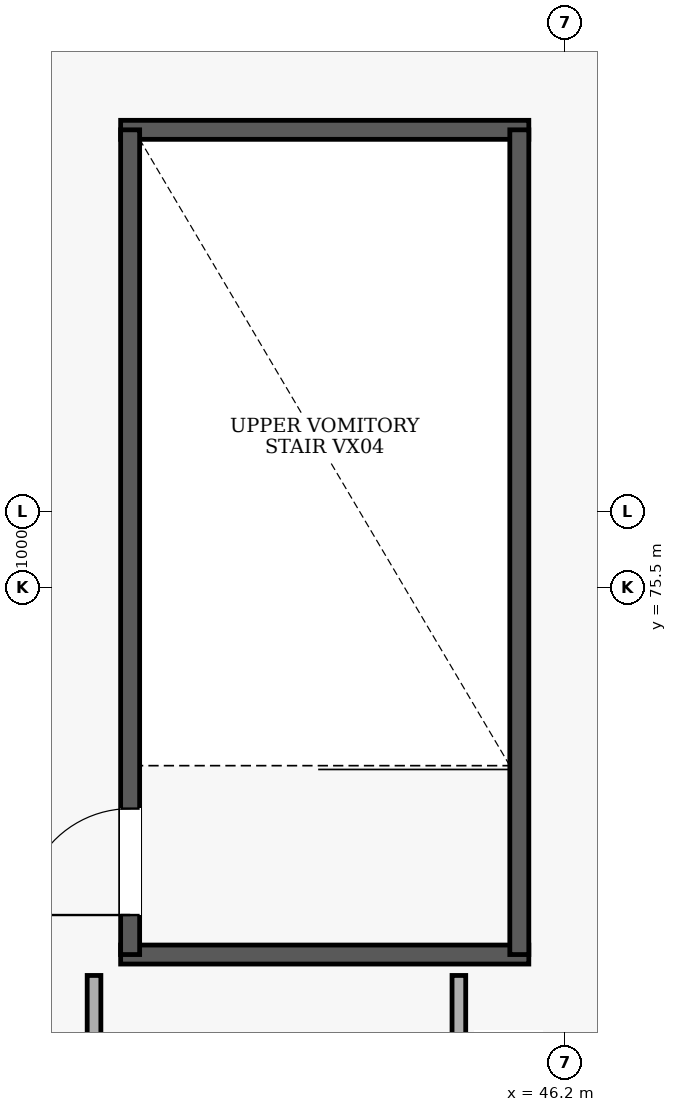
"""IFC4 building model, lengths in metres.
Left out: names, types, materials, properties, quantities, classifications, styles, units other than length and angle.
Written with IfcOpenShell. Run it as: python <this file> out.ifc"""

import sys

from ifc_helpers import new_model, si_unit, direction, frame, frame_2d, origin, place, context, subcontext, project, spatial, rectangle, extrude, element, fill, save


model = new_model("IFC4")
c1 = context("Model", 3, precision=1e-05, world=origin(), true_north=direction((0.0, 1.0)))
c2 = subcontext(c1, "Body", "Model", "MODEL_VIEW")
j1 = project(units=[si_unit("LENGTHUNIT", "METRE"), si_unit("PLANEANGLEUNIT", "RADIAN")], contexts=[c1])
p1 = place(None, origin())
s1 = spatial("IfcSite", under=j1, at=p1, CompositionType="ELEMENT")
p2 = place(p1, origin())
s2 = spatial("IfcBuilding", under=s1, at=p2, CompositionType="ELEMENT")
p3 = place(p2, frame((0.0, 0.0, 15.0)))
s3 = spatial("IfcBuildingStorey", under=s2, at=p3, CompositionType="ELEMENT", Elevation=15.0)
for number, where, z_axis, x_axis in (
    (1, (40.35, 70.675, 0.0), (0.0, 0.0, 1.0), (1.0, 0.0, 0.0)),
    (2, (45.72, 81.525, 0.0), (0.0, 0.0, 1.0), (-1.0, 0.0, 0.0)),
):
    element("IfcWall", number, at=place(p3, frame(where, z_axis=z_axis, x_axis=x_axis)), inside=s3, PredefinedType="SHEAR", context=c2, shape_type="SweptSolid", body=[
        extrude(rectangle(XDim=5.37, YDim=0.25, at=frame_2d((2.685, 0.0))), origin(), (0.0, 0.0, 1.0), 4.5),
    ])
p4 = place(p3, frame((40.475, 70.675, 0.0), z_axis=(0.0, 0.0, 1.0), x_axis=(0.0, 1.0, 0.0)))
e3 = element("IfcWall", 3, at=p4, inside=s3, PredefinedType="SHEAR", context=c2, shape_type="SweptSolid", body=[
    extrude(rectangle(XDim=10.85, YDim=0.25, at=frame_2d((5.425, 0.0))), origin(), (0.0, 0.0, 1.0), 4.5),
])
p5 = place(p4, frame((0.52, 0.0, 0.0)))
e4 = element("IfcOpeningElement", 4, at=p5, cuts=e3, PredefinedType="OPENING", context=c2, shape_type="SweptSolid", body=[
    extrude(rectangle(XDim=1.4, YDim=2.15, at=frame_2d((0.7, 1.075))), frame((0.0, 0.135, 0.0), z_axis=(0.0, -1.0, 0.0), x_axis=(1.0, 0.0, 0.0)), (0.0, 0.0, 1.0), 0.27),
])
p6 = place(p3, frame((45.595, 70.675, 0.0), z_axis=(0.0, 0.0, 1.0), x_axis=(0.0, 1.0, 0.0)))
e5 = element("IfcWall", 5, at=p6, inside=s3, PredefinedType="SHEAR", context=c2, shape_type="SweptSolid", body=[
    extrude(rectangle(XDim=10.85, YDim=0.25, at=frame_2d((5.425, 0.0))), origin(), (0.0, 0.0, 1.0), 4.5),
])
p7 = place(p3, frame((44.8, 67.33, 0.0), z_axis=(0.0, 0.0, 1.0), x_axis=(0.0, 1.0, 0.0)))
e6 = element("IfcWall", 6, at=p7, inside=s3, PredefinedType="PARTITIONING", context=c2, shape_type="SweptSolid", body=[
    extrude(rectangle(XDim=3.07, YDim=0.18, at=frame_2d((1.535, 0.0))), origin(), (0.0, 0.0, 1.0), 4.5),
])
p8 = place(p3, frame((40.0, 70.4, 0.0), z_axis=(0.0, 0.0, 1.0), x_axis=(0.0, -1.0, 0.0)))
e7 = element("IfcWall", 7, at=p8, inside=s3, PredefinedType="PARTITIONING", context=c2, shape_type="SweptSolid", body=[
    extrude(rectangle(XDim=3.07, YDim=0.18, at=frame_2d((1.535, 0.0))), origin(), (0.0, 0.0, 1.0), 4.5),
])
p9 = place(p8, frame((1.035, 0.0, 0.0)))
e8 = element("IfcOpeningElement", 8, at=p9, cuts=e7, PredefinedType="OPENING", context=c2, shape_type="SweptSolid", body=[
    extrude(rectangle(XDim=1.0, YDim=2.1, at=frame_2d((0.5, 1.05))), frame((0.0, 0.1, 0.0), z_axis=(0.0, -1.0, 0.0), x_axis=(1.0, 0.0, 0.0)), (0.0, 0.0, 1.0), 0.2),
])
p10 = place(p5, frame((1.4, 0.0, 0.0), z_axis=(0.0, 0.0, 1.0), x_axis=(-1.0, 0.0, 0.0)))
e9 = element("IfcDoor", 9, at=p10, inside=s3, OperationType="SINGLE_SWING_RIGHT", PredefinedType="DOOR", context=c2, shape_type="SweptSolid", body=[
    extrude(rectangle(XDim=1.4, YDim=2.15, at=frame_2d((0.7, 1.075))), frame((0.0, 0.025, 0.0), z_axis=(0.0, -1.0, 0.0), x_axis=(1.0, 0.0, 0.0)), (0.0, 0.0, 1.0), 0.05),
])
fill(e4, e9)
save(model, sys.argv[1])
